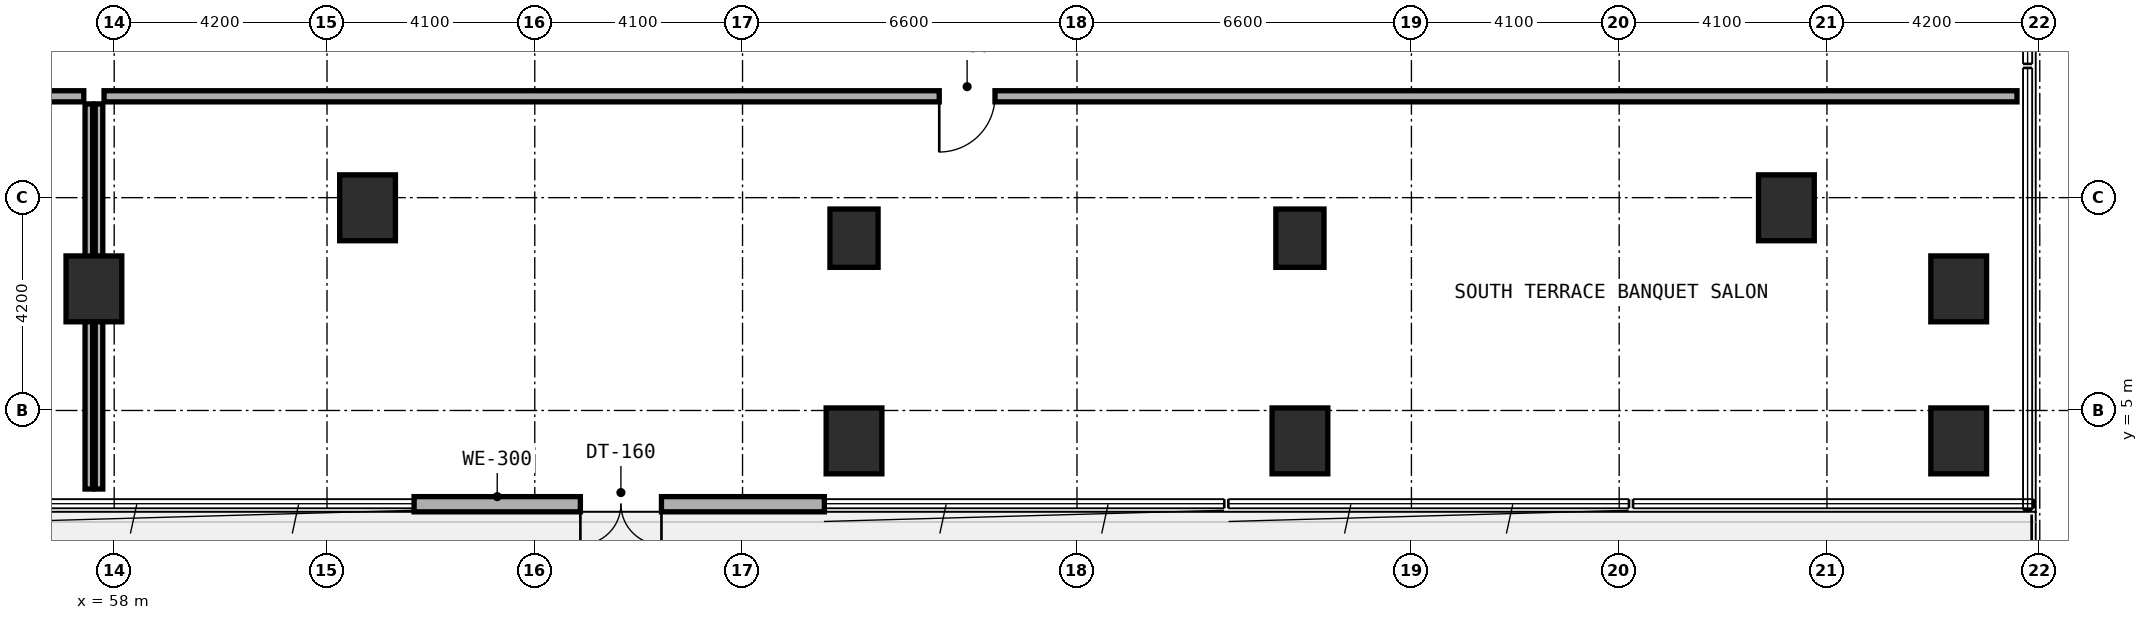
"""IFC4 building model, lengths in metres.
Left out: names, types, materials, properties, quantities, classifications, styles, units other than length and angle.
Written with IfcOpenShell. Run it as: python <this file> out.ifc"""

import sys

from ifc_helpers import new_model, si_unit, direction, frame, frame_2d, origin, origin_2d, place, context, subcontext, project, spatial, rectangle, extrude, element, fill, save


model = new_model("IFC4")
c1 = context("Model", 3, precision=1e-05, world=origin(), true_north=direction((0.0, 1.0)))
c2 = subcontext(c1, "Body", "Model", "MODEL_VIEW")
j1 = project(units=[si_unit("LENGTHUNIT", "METRE"), si_unit("PLANEANGLEUNIT", "RADIAN")], contexts=[c1])
p1 = place(None, origin())
s1 = spatial("IfcSite", under=j1, at=p1, CompositionType="ELEMENT")
p2 = place(p1, origin())
s2 = spatial("IfcBuilding", under=s1, at=p2, CompositionType="ELEMENT")
p3 = place(p2, frame((0.0, 0.0, 10.2)))
s3 = spatial("IfcBuildingStorey", under=s2, at=p3, CompositionType="ELEMENT", Elevation=10.2)
for number, where, z_axis, x_axis in (
    (1, (72.6, 8.4, 0.0), (0.0, 0.0, 1.0), (1.0, 0.0, 0.0)),
    (2, (81.4, 8.4, 0.0), (0.0, 0.0, 1.0), (1.0, 0.0, 0.0)),
):
    element("IfcColumn", number, at=place(p3, frame(where, z_axis=z_axis, x_axis=x_axis)), inside=s3, PredefinedType="COLUMN", context=c2, shape_type="SweptSolid", body=[
        extrude(rectangle(XDim=0.95, YDim=1.15, at=origin_2d()), origin(), (0.0, 0.0, 1.0), 4.8),
    ])
for number, where, z_axis, x_axis in (
    (3, (63.0, 9.0, 0.0), (0.0, 0.0, 1.0), (1.0, 0.0, 0.0)),
    (4, (91.0, 9.0, 0.0), (0.0, 0.0, 1.0), (1.0, 0.0, 0.0)),
    (5, (72.6, 4.4, 0.0), (0.0, 0.0, 1.0), (1.0, 0.0, 0.0)),
    (6, (81.4, 4.4, 0.0), (0.0, 0.0, 1.0), (1.0, 0.0, 0.0)),
    (7, (94.4, 4.4, 0.0), (0.0, 0.0, 1.0), (1.0, 0.0, 0.0)),
    (8, (57.6, 7.4, 0.0), (0.0, 0.0, 1.0), (1.0, 0.0, 0.0)),
    (9, (94.4, 7.4, 0.0), (0.0, 0.0, 1.0), (1.0, 0.0, 0.0)),
):
    element("IfcColumn", number, at=place(p3, frame(where, z_axis=z_axis, x_axis=x_axis)), inside=s3, PredefinedType="COLUMN", context=c2, shape_type="SweptSolid", body=[
        extrude(rectangle(XDim=1.1, YDim=1.3, at=origin_2d()), origin(), (0.0, 0.0, 1.0), 4.8),
    ])
p4 = place(p3, frame((63.918, 3.15, 0.0), z_axis=(0.0, 0.0, 1.0), x_axis=(1.0, 0.0, 0.0)))
e10 = element("IfcWall", 10, at=p4, inside=s3, PredefinedType="STANDARD", context=c2, shape_type="SweptSolid", body=[
    extrude(rectangle(XDim=8.097, YDim=0.3, at=frame_2d((4.048, 0.0))), origin(), (0.0, 0.0, 1.0), 4.45),
])
p5 = place(p4, frame((3.282, 0.0, 0.0)))
e11 = element("IfcOpeningElement", 11, at=p5, cuts=e10, PredefinedType="OPENING", context=c2, shape_type="SweptSolid", body=[
    extrude(rectangle(XDim=1.6, YDim=2.2, at=frame_2d((0.8, 1.1))), frame((0.0, 0.16, 0.0), z_axis=(0.0, -1.0, 0.0), x_axis=(1.0, 0.0, 0.0)), (0.0, 0.0, 1.0), 0.32),
])
p6 = place(p3, frame((57.5, 3.45, 0.0), z_axis=(0.0, 0.0, 1.0), x_axis=(0.0, 1.0, 0.0)))
e12 = element("IfcWall", 12, at=p6, inside=s3, PredefinedType="PARTITIONING", context=c2, shape_type="SweptSolid", body=[
    extrude(rectangle(XDim=7.6, YDim=0.15, at=frame_2d((3.8, 0.0))), origin(), (0.0, 0.0, 1.0), 3.625),
])
p7 = place(p3, frame((42.0, 11.2, 0.0), z_axis=(0.0, 0.0, 1.0), x_axis=(1.0, 0.0, 0.0)))
e13 = element("IfcWall", 13, at=p7, inside=s3, PredefinedType="SOLIDWALL", context=c2, shape_type="SweptSolid", body=[
    extrude(rectangle(XDim=15.4, YDim=0.22, at=frame_2d((7.7, 0.0))), origin(), (0.0, 0.0, 1.0), 4.45),
])
p8 = place(p7, frame((6.425, 0.0, 0.0)))
e14 = element("IfcOpeningElement", 14, at=p8, cuts=e13, PredefinedType="OPENING", context=c2, shape_type="SweptSolid", body=[
    extrude(rectangle(XDim=1.1, YDim=2.1, at=frame_2d((0.55, 1.05))), frame((0.0, 0.12, 0.0), z_axis=(0.0, -1.0, 0.0), x_axis=(1.0, 0.0, 0.0)), (0.0, 0.0, 1.0), 0.24),
])
p9 = place(p3, frame((57.7, 3.45, 0.0), z_axis=(0.0, 0.0, 1.0), x_axis=(0.0, 1.0, 0.0)))
e15 = element("IfcWall", 15, at=p9, inside=s3, PredefinedType="PARTITIONING", context=c2, shape_type="SweptSolid", body=[
    extrude(rectangle(XDim=7.6, YDim=0.15, at=frame_2d((3.8, 0.0))), origin(), (0.0, 0.0, 1.0), 3.725),
])
p10 = place(p3, frame((57.8, 11.2, 0.0), z_axis=(0.0, 0.0, 1.0), x_axis=(1.0, 0.0, 0.0)))
e16 = element("IfcWall", 16, at=p10, inside=s3, PredefinedType="SOLIDWALL", context=c2, shape_type="SweptSolid", body=[
    extrude(rectangle(XDim=37.75, YDim=0.22, at=frame_2d((18.875, 0.0))), origin(), (0.0, 0.0, 1.0), 3.925),
])
p11 = place(p10, frame((16.482, 0.0, 0.0)))
e17 = element("IfcOpeningElement", 17, at=p11, cuts=e16, PredefinedType="OPENING", context=c2, shape_type="SweptSolid", body=[
    extrude(rectangle(XDim=1.1, YDim=2.1, at=frame_2d((0.55, 1.05))), frame((0.0, 0.12, 0.0), z_axis=(0.0, -1.0, 0.0), x_axis=(1.0, 0.0, 0.0)), (0.0, 0.0, 1.0), 0.24),
])
p12 = place(p5, frame((1.6, 0.0, 0.0), z_axis=(0.0, 0.0, 1.0), x_axis=(-1.0, 0.0, 0.0)))
e18 = element("IfcDoor", 18, at=p12, inside=s3, OperationType="DOUBLE_DOOR_SINGLE_SWING", PredefinedType="DOOR", context=c2, shape_type="SweptSolid", body=[
    extrude(rectangle(XDim=1.6, YDim=2.2, at=frame_2d((0.8, 1.1))), frame((0.0, 0.025, 0.0), z_axis=(0.0, -1.0, 0.0), x_axis=(1.0, 0.0, 0.0)), (0.0, 0.0, 1.0), 0.05),
])
fill(e11, e18)
p13 = place(p11, frame((1.1, 0.0, 0.0), z_axis=(0.0, 0.0, 1.0), x_axis=(-1.0, 0.0, 0.0)))
e19 = element("IfcDoor", 19, at=p13, inside=s3, OperationType="SINGLE_SWING_RIGHT", PredefinedType="DOOR", context=c2, shape_type="SweptSolid", body=[
    extrude(rectangle(XDim=1.1, YDim=2.1, at=frame_2d((0.55, 1.05))), frame((0.0, 0.025, 0.0), z_axis=(0.0, -1.0, 0.0), x_axis=(1.0, 0.0, 0.0)), (0.0, 0.0, 1.0), 0.05),
])
fill(e17, e19)
save(model, sys.argv[1])
